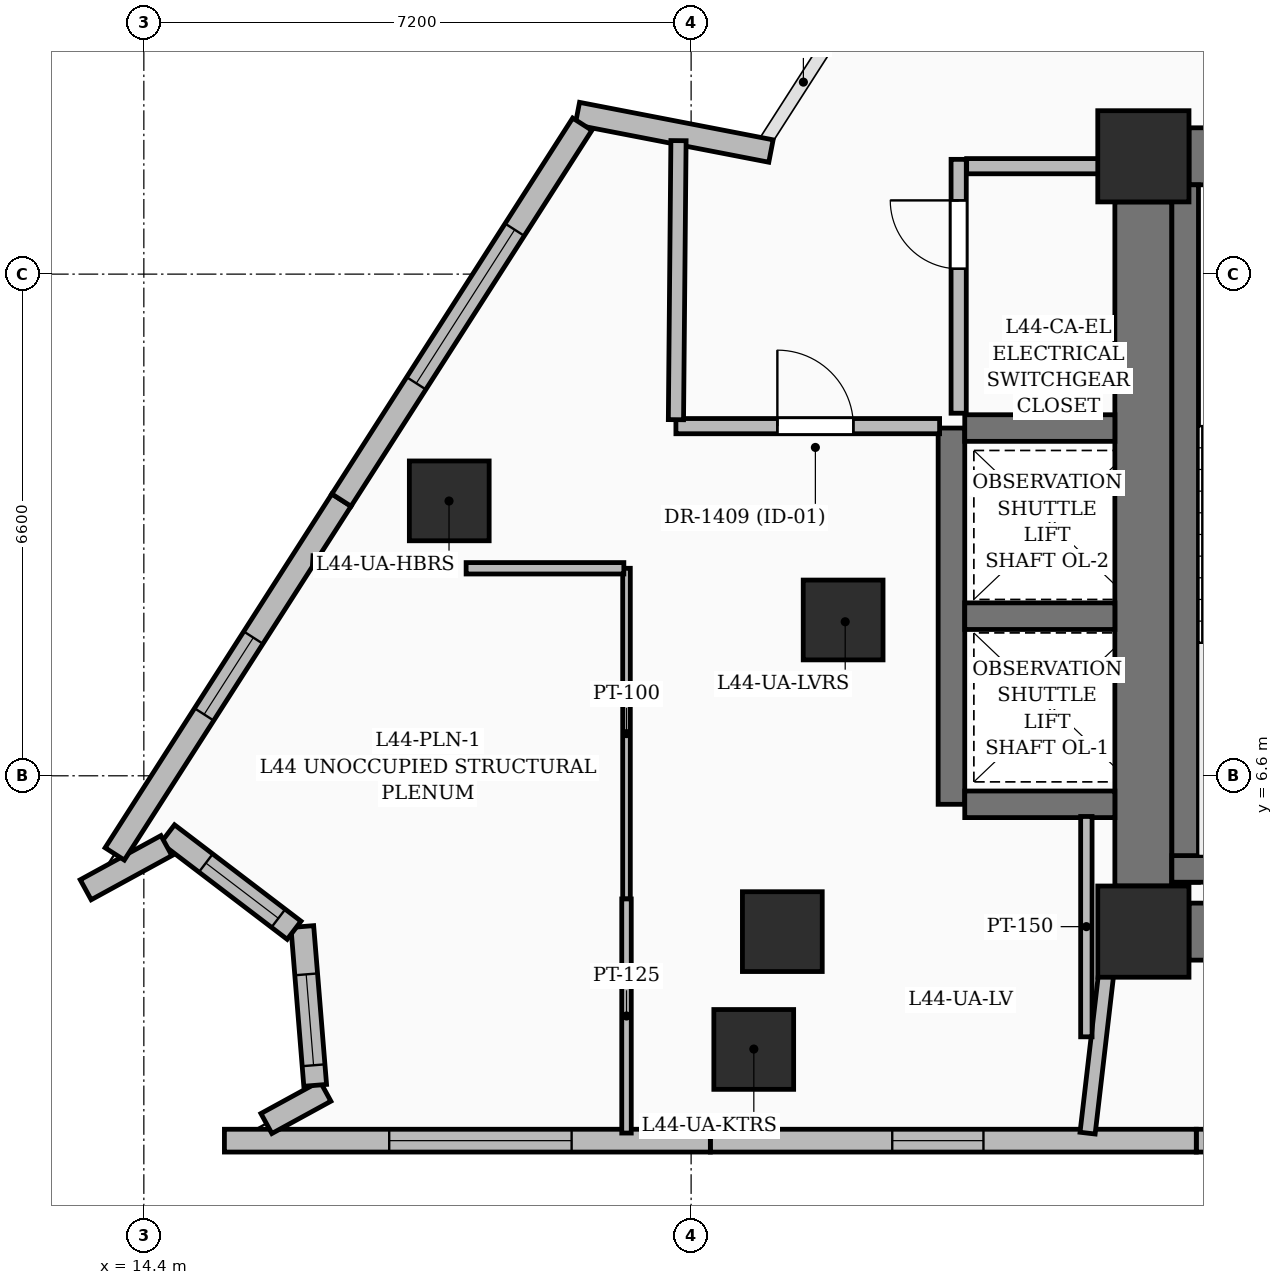
"""IFC4 building model, lengths in metres.
Left out: names, types, materials, properties, quantities, classifications, styles, units other than length and angle.
Written with IfcOpenShell. Run it as: python <this file> out.ifc"""

import sys

from ifc_helpers import new_model, si_unit, direction, frame, frame_2d, origin, origin_2d, place, context, subcontext, project, spatial, rectangle, extrude, element, fill, save


model = new_model("IFC4")
c1 = context("Model", 3, precision=1e-05, world=origin(), true_north=direction((0.0, 1.0)))
c2 = subcontext(c1, "Body", "Model", "MODEL_VIEW")
j1 = project(units=[si_unit("LENGTHUNIT", "METRE"), si_unit("PLANEANGLEUNIT", "RADIAN")], contexts=[c1])
p1 = place(None, origin())
s1 = spatial("IfcSite", under=j1, at=p1, CompositionType="ELEMENT")
p2 = place(p1, origin())
s2 = spatial("IfcBuilding", under=s1, at=p2, CompositionType="ELEMENT")
p3 = place(p2, frame((0.0, 0.0, 171.6)))
s3 = spatial("IfcBuildingStorey", under=s2, at=p3, CompositionType="ELEMENT", Elevation=171.6)
for number, where, z_axis, x_axis in (
    (1, (27.55, 4.55, 0.0), (0.0, 0.0, 1.0), (1.0, 0.0, 0.0)),
    (2, (27.55, 14.75, 0.0), (0.0, 0.0, 1.0), (1.0, 0.0, 0.0)),
):
    element("IfcColumn", number, at=place(p3, frame(where, z_axis=z_axis, x_axis=x_axis)), inside=s3, PredefinedType="COLUMN", context=c2, shape_type="SweptSolid", body=[
        extrude(rectangle(XDim=1.2, YDim=1.2, at=origin_2d()), origin(), (0.0, 0.0, 1.0), 3.6),
    ])
for number, where, z_axis, x_axis in (
    (3, (22.8, 4.55, 0.0), (0.0, 0.0, 1.0), (1.0, 0.0, 0.0)),
    (4, (23.6, 8.65, 0.0), (0.0, 0.0, 1.0), (1.0, 0.0, 0.0)),
):
    element("IfcColumn", number, at=place(p3, frame(where, z_axis=z_axis, x_axis=x_axis)), inside=s3, PredefinedType="COLUMN", context=c2, shape_type="SweptSolid", body=[
        extrude(rectangle(XDim=1.05, YDim=1.05, at=origin_2d()), origin(), (0.0, 0.0, 1.0), 3.6),
    ])
p4 = place(p3, frame((28.15, 4.55, 0.0), z_axis=(0.0, 0.0, 1.0), x_axis=(1.0, 0.0, 0.0)))
e5 = element("IfcWall", 5, at=p4, inside=s3, PredefinedType="SHEAR", context=c2, shape_type="SweptSolid", body=[
    extrude(rectangle(XDim=6.4, YDim=0.75, at=frame_2d((3.2, 0.0))), origin(), (0.0, 0.0, 1.0), 3.6),
])
p5 = place(p3, frame((28.15, 14.75, 0.0), z_axis=(0.0, 0.0, 1.0), x_axis=(1.0, 0.0, 0.0)))
e6 = element("IfcWall", 6, at=p5, inside=s3, PredefinedType="SHEAR", context=c2, shape_type="SweptSolid", body=[
    extrude(rectangle(XDim=6.4, YDim=0.75, at=frame_2d((3.2, 0.0))), origin(), (0.0, 0.0, 1.0), 3.6),
])
p6 = place(p5, frame((1.025, 0.0, 0.0)))
e7 = element("IfcOpeningElement", 7, at=p6, cuts=e6, PredefinedType="OPENING", context=c2, shape_type="SweptSolid", body=[
    extrude(rectangle(XDim=1.05, YDim=2.15, at=frame_2d((0.525, 1.075))), frame((0.0, 0.385, 0.0), z_axis=(0.0, -1.0, 0.0), x_axis=(1.0, 0.0, 0.0)), (0.0, 0.0, 1.0), 0.77),
])
p7 = place(p5, frame((3.8, 0.0, 0.0)))
e8 = element("IfcOpeningElement", 8, at=p7, cuts=e6, PredefinedType="OPENING", context=c2, shape_type="SweptSolid", body=[
    extrude(rectangle(XDim=1.1, YDim=2.2, at=frame_2d((0.55, 1.1))), frame((0.0, 0.385, 0.0), z_axis=(0.0, -1.0, 0.0), x_axis=(1.0, 0.0, 0.0)), (0.0, 0.0, 1.0), 0.77),
])
p8 = place(p3, frame((27.55, 5.15, 0.0), z_axis=(0.0, 0.0, 1.0), x_axis=(0.0, 1.0, 0.0)))
e9 = element("IfcWall", 9, at=p8, inside=s3, PredefinedType="SHEAR", context=c2, shape_type="SweptSolid", body=[
    extrude(rectangle(XDim=9.0, YDim=0.75, at=frame_2d((4.5, 0.0))), origin(), (0.0, 0.0, 1.0), 3.6),
])
p9 = place(p3, frame((28.1, 5.2, 0.0), z_axis=(0.0, 0.0, 1.0), x_axis=(0.0, 1.0, 0.0)))
e10 = element("IfcWall", 10, at=p9, inside=s3, PredefinedType="SOLIDWALL", context=c2, shape_type="SweptSolid", body=[
    extrude(rectangle(XDim=9.175, YDim=0.35, at=frame_2d((4.587, 0.0))), origin(), (0.0, 0.0, 1.0), 3.6),
])
p10 = place(p3, frame((27.925, 5.375, 0.0), z_axis=(0.0, 0.0, 1.0), x_axis=(1.0, 0.0, 0.0)))
e11 = element("IfcWall", 11, at=p10, inside=s3, PredefinedType="SOLIDWALL", context=c2, shape_type="SweptSolid", body=[
    extrude(rectangle(XDim=3.55, YDim=0.35, at=frame_2d((1.775, 0.0))), origin(), (0.0, 0.0, 1.0), 3.6),
])
p11 = place(p3, frame((25.025, 6.225, 0.0), z_axis=(0.0, 0.0, 1.0), x_axis=(0.0, 1.0, 0.0)))
e12 = element("IfcWall", 12, at=p11, inside=s3, PredefinedType="SOLIDWALL", context=c2, shape_type="SweptSolid", body=[
    extrude(rectangle(XDim=4.95, YDim=0.35, at=frame_2d((2.475, 0.0))), origin(), (0.0, 0.0, 1.0), 3.6),
])
for number, where, z_axis, x_axis in (
    (13, (25.2, 6.225, 0.0), (0.0, 0.0, 1.0), (1.0, 0.0, 0.0)),
    (14, (25.2, 8.7, 0.0), (0.0, 0.0, 1.0), (1.0, 0.0, 0.0)),
    (15, (25.2, 11.175, 0.0), (0.0, 0.0, 1.0), (1.0, 0.0, 0.0)),
):
    element("IfcWall", number, at=place(p3, frame(where, z_axis=z_axis, x_axis=x_axis)), inside=s3, PredefinedType="SOLIDWALL", context=c2, shape_type="SweptSolid", body=[
        extrude(rectangle(XDim=1.975, YDim=0.35, at=frame_2d((0.988, 0.0))), origin(), (0.0, 0.0, 1.0), 3.6),
    ])
for number, where, z_axis, x_axis in (
    (16, (22.424, 3.0, 0.0), (0.0, 0.0, 1.0), (1.0, 0.0, 0.0)),
    (17, (18.418, 10.217, 0.0), (0.0, 0.0, 1.0), (1.0, 0.0, 0.0)),
):
    element("IfcColumn", number, at=place(p3, frame(where, z_axis=z_axis, x_axis=x_axis)), inside=s3, PredefinedType="COLUMN", context=c2, shape_type="SweptSolid", body=[
        extrude(rectangle(XDim=1.05, YDim=1.05, at=origin_2d()), origin(), (0.0, 0.0, 1.0), 3.6),
    ])
p12 = place(p3, frame((20.104, 15.312, 0.0), z_axis=(0.0, 0.0, 1.0), x_axis=(0.98176398898, -0.190103839891, 0.0)))
e18 = element("IfcWall", 18, at=p12, inside=s3, PredefinedType="SOLIDWALL", context=c2, shape_type="SweptSolid", body=[
    extrude(rectangle(XDim=2.594, YDim=0.3, at=frame_2d((1.297, 0.0))), origin(), (0.0, 0.0, 1.0), 2.575),
])
p13 = place(p3, frame((34.639, 1.8, 0.0), z_axis=(0.0, 0.0, 1.0), x_axis=(-1.0, 0.0, 0.0)))
e19 = element("IfcWall", 19, at=p13, inside=s3, PredefinedType="SOLIDWALL", context=c2, shape_type="SweptSolid", body=[
    extrude(rectangle(XDim=6.393, YDim=0.3, at=frame_2d((3.196, 0.0))), origin(), (0.0, 0.0, 1.0), 3.35),
])
p14 = place(p13, frame((2.4, 0.0, 0.6)))
e20 = element("IfcOpeningElement", 20, at=p14, cuts=e19, PredefinedType="OPENING", context=c2, shape_type="SweptSolid", body=[
    extrude(rectangle(XDim=1.5, YDim=2.1, at=frame_2d((0.75, 1.05))), frame((0.0, 0.16, 0.0), z_axis=(0.0, -1.0, 0.0), x_axis=(1.0, 0.0, 0.0)), (0.0, 0.0, 1.0), 0.32),
])
p15 = place(p3, frame((28.246, 1.8, 0.0), z_axis=(0.0, 0.0, 1.0), x_axis=(-1.0, 0.0, 0.0)))
e21 = element("IfcWall", 21, at=p15, inside=s3, PredefinedType="SOLIDWALL", context=c2, shape_type="SweptSolid", body=[
    extrude(rectangle(XDim=6.393, YDim=0.3, at=frame_2d((3.197, 0.0))), origin(), (0.0, 0.0, 1.0), 3.35),
])
p16 = place(p15, frame((2.8, 0.0, 0.8)))
e22 = element("IfcOpeningElement", 22, at=p16, cuts=e21, PredefinedType="OPENING", context=c2, shape_type="SweptSolid", body=[
    extrude(rectangle(XDim=1.2, YDim=1.8, at=frame_2d((0.6, 0.9))), frame((0.0, 0.16, 0.0), z_axis=(0.0, -1.0, 0.0), x_axis=(1.0, 0.0, 0.0)), (0.0, 0.0, 1.0), 0.32),
])
p17 = place(p3, frame((21.853, 1.8, 0.0), z_axis=(0.0, 0.0, 1.0), x_axis=(-1.0, 0.0, 0.0)))
e23 = element("IfcWall", 23, at=p17, inside=s3, PredefinedType="SOLIDWALL", context=c2, shape_type="SweptSolid", body=[
    extrude(rectangle(XDim=6.393, YDim=0.3, at=frame_2d((3.197, 0.0))), origin(), (0.0, 0.0, 1.0), 3.35),
])
p18 = place(p17, frame((1.825, 0.0, 0.6)))
e24 = element("IfcOpeningElement", 24, at=p18, cuts=e23, PredefinedType="OPENING", context=c2, shape_type="SweptSolid", body=[
    extrude(rectangle(XDim=2.4, YDim=2.1, at=frame_2d((1.2, 1.05))), frame((0.0, 0.16, 0.0), z_axis=(0.0, -1.0, 0.0), x_axis=(1.0, 0.0, 0.0)), (0.0, 0.0, 1.0), 0.32),
])
p19 = place(p3, frame((16.012, 2.025, 0.0), z_axis=(0.0, 0.0, 1.0), x_axis=(0.877262241919, 0.480011415389, 0.0)))
e25 = element("IfcWall", 25, at=p19, inside=s3, PredefinedType="SOLIDWALL", context=c2, shape_type="SweptSolid", body=[
    extrude(rectangle(XDim=0.885, YDim=0.3, at=frame_2d((0.442, 0.0))), origin(), (0.0, 0.0, 1.0), 3.35),
])
p20 = place(p3, frame((16.654, 2.528, 0.0), z_axis=(0.0, 0.0, 1.0), x_axis=(-0.080962879454, 0.996717117416, 0.0)))
e26 = element("IfcWall", 26, at=p20, inside=s3, PredefinedType="SOLIDWALL", context=c2, shape_type="SweptSolid", body=[
    extrude(rectangle(XDim=2.096, YDim=0.3, at=frame_2d((1.048, 0.0))), origin(), (0.0, 0.0, 1.0), 3.35),
])
p21 = place(p20, frame((0.265, 0.0, 0.8)))
e27 = element("IfcOpeningElement", 27, at=p21, cuts=e26, PredefinedType="OPENING", context=c2, shape_type="SweptSolid", body=[
    extrude(rectangle(XDim=1.2, YDim=1.8, at=frame_2d((0.6, 0.9))), frame((0.0, 0.16, 0.0), z_axis=(0.0, -1.0, 0.0), x_axis=(1.0, 0.0, 0.0)), (0.0, 0.0, 1.0), 0.32),
])
p22 = place(p3, frame((16.377, 4.568, 0.0), z_axis=(0.0, 0.0, 1.0), x_axis=(-0.795383499791, 0.606106499107, 0.0)))
e28 = element("IfcWall", 28, at=p22, inside=s3, PredefinedType="SOLIDWALL", context=c2, shape_type="SweptSolid", body=[
    extrude(rectangle(XDim=2.092, YDim=0.3, at=frame_2d((1.046, 0.0))), origin(), (0.0, 0.0, 1.0), 3.35),
])
p23 = place(p22, frame((0.26, 0.0, 0.8)))
e29 = element("IfcOpeningElement", 29, at=p23, cuts=e28, PredefinedType="OPENING", context=c2, shape_type="SweptSolid", body=[
    extrude(rectangle(XDim=1.2, YDim=1.8, at=frame_2d((0.6, 0.9))), frame((0.0, 0.16, 0.0), z_axis=(0.0, -1.0, 0.0), x_axis=(1.0, 0.0, 0.0)), (0.0, 0.0, 1.0), 0.32),
])
p24 = place(p3, frame((14.697, 5.681, 0.0), z_axis=(0.0, 0.0, 1.0), x_axis=(-0.877355211776, -0.47984146587, 0.0)))
e30 = element("IfcWall", 30, at=p24, inside=s3, PredefinedType="SOLIDWALL", context=c2, shape_type="SweptSolid", body=[
    extrude(rectangle(XDim=1.21, YDim=0.3, at=frame_2d((0.605, 0.0))), origin(), (0.0, 0.0, 1.0), 3.35),
])
p25 = place(p3, frame((14.017, 5.572, 0.0), z_axis=(0.0, 0.0, 1.0), x_axis=(0.539464660722, 0.84200824214, 0.0)))
e31 = element("IfcWall", 31, at=p25, inside=s3, PredefinedType="SOLIDWALL", context=c2, shape_type="SweptSolid", body=[
    extrude(rectangle(XDim=5.529, YDim=0.3, at=frame_2d((2.764, 0.0))), origin(), (0.0, 0.0, 1.0), 3.35),
])
p26 = place(p25, frame((2.18, 0.0, 0.8)))
e32 = element("IfcOpeningElement", 32, at=p26, cuts=e31, PredefinedType="OPENING", context=c2, shape_type="SweptSolid", body=[
    extrude(rectangle(XDim=1.2, YDim=1.8, at=frame_2d((0.6, 0.9))), frame((0.0, 0.16, 0.0), z_axis=(0.0, -1.0, 0.0), x_axis=(1.0, 0.0, 0.0)), (0.0, 0.0, 1.0), 0.32),
])
p27 = place(p3, frame((17.0, 10.227, 0.0), z_axis=(0.0, 0.0, 1.0), x_axis=(0.539500668401, 0.841985171363, 0.0)))
e33 = element("IfcWall", 33, at=p27, inside=s3, PredefinedType="SOLIDWALL", context=c2, shape_type="SweptSolid", body=[
    extrude(rectangle(XDim=5.873, YDim=0.3, at=frame_2d((2.937, 0.0))), origin(), (0.0, 0.0, 1.0), 3.35),
])
p28 = place(p27, frame((1.825, 0.0, 0.6)))
e34 = element("IfcOpeningElement", 34, at=p28, cuts=e33, PredefinedType="OPENING", context=c2, shape_type="SweptSolid", body=[
    extrude(rectangle(XDim=2.4, YDim=2.1, at=frame_2d((1.2, 1.05))), frame((0.0, 0.16, 0.0), z_axis=(0.0, -1.0, 0.0), x_axis=(1.0, 0.0, 0.0)), (0.0, 0.0, 1.0), 0.32),
])
p29 = place(p3, frame((25.12, 11.37, 0.0), z_axis=(0.0, 0.0, 1.0), x_axis=(0.0, 1.0, 0.0)))
e35 = element("IfcWall", 35, at=p29, inside=s3, PredefinedType="PARTITIONING", context=c2, shape_type="SweptSolid", body=[
    extrude(rectangle(XDim=3.34, YDim=0.2, at=frame_2d((1.67, 0.0))), origin(), (0.0, 0.0, 1.0), 3.35),
])
p30 = place(p29, frame((1.9, 0.0, 0.0)))
e36 = element("IfcOpeningElement", 36, at=p30, cuts=e35, PredefinedType="OPENING", context=c2, shape_type="SweptSolid", body=[
    extrude(rectangle(XDim=0.9, YDim=2.1, at=frame_2d((0.45, 1.05))), frame((0.0, 0.11, 0.0), z_axis=(0.0, -1.0, 0.0), x_axis=(1.0, 0.0, 0.0)), (0.0, 0.0, 1.0), 0.22),
])
p31 = place(p3, frame((25.225, 14.62, 0.0), z_axis=(0.0, 0.0, 1.0), x_axis=(1.0, 0.0, 0.0)))
e37 = element("IfcWall", 37, at=p31, inside=s3, PredefinedType="PARTITIONING", context=c2, shape_type="SweptSolid", body=[
    extrude(rectangle(XDim=1.935, YDim=0.2, at=frame_2d((0.967, 0.0))), origin(), (0.0, 0.0, 1.0), 3.35),
])
p32 = place(p3, frame((21.4, 11.2, 0.0), z_axis=(0.0, 0.0, 1.0), x_axis=(1.0, 0.0, 0.0)))
e38 = element("IfcWall", 38, at=p32, inside=s3, PredefinedType="PARTITIONING", context=c2, shape_type="SweptSolid", body=[
    extrude(rectangle(XDim=3.469, YDim=0.2, at=frame_2d((1.735, 0.0))), origin(), (0.0, 0.0, 1.0), 3.35),
])
p33 = place(p32, frame((1.335, 0.0, 0.0)))
e39 = element("IfcOpeningElement", 39, at=p33, cuts=e38, PredefinedType="OPENING", context=c2, shape_type="SweptSolid", body=[
    extrude(rectangle(XDim=1.0, YDim=2.2, at=frame_2d((0.5, 1.1))), frame((0.0, 0.11, 0.0), z_axis=(0.0, -1.0, 0.0), x_axis=(1.0, 0.0, 0.0)), (0.0, 0.0, 1.0), 0.22),
])
p34 = place(p3, frame((20.75, 9.33, 0.0), z_axis=(0.0, 0.0, 1.0), x_axis=(0.0, -1.0, 0.0)))
e40 = element("IfcWall", 40, at=p34, inside=s3, PredefinedType="PARTITIONING", context=c2, shape_type="SweptSolid", body=[
    extrude(rectangle(XDim=4.35, YDim=0.1, at=frame_2d((2.175, 0.0))), origin(), (0.0, 0.0, 1.0), 1.12),
])
p35 = place(p3, frame((16.621, 9.42, 0.0), z_axis=(0.0, 0.0, 1.0), x_axis=(0.99838487267, -0.056812375621, 0.0)))
e41 = element("IfcWall", 41, at=p35, inside=s3, PredefinedType="PARTITIONING", context=c2, shape_type="SweptSolid", body=[
    extrude(rectangle(XDim=1.581, YDim=0.15, at=frame_2d((0.791, 0.0))), origin(), (0.0, 0.0, 1.0), 3.35),
])
p36 = place(p3, frame((18.64, 9.33, 0.0), z_axis=(0.0, 0.0, 1.0), x_axis=(1.0, 0.0, 0.0)))
e42 = element("IfcWall", 42, at=p36, inside=s3, PredefinedType="PARTITIONING", context=c2, shape_type="SweptSolid", body=[
    extrude(rectangle(XDim=2.075, YDim=0.15, at=frame_2d((1.038, 0.0))), origin(), (0.0, 0.0, 1.0), 1.12),
])
p37 = place(p3, frame((20.75, 4.98, 0.0), z_axis=(0.0, 0.0, 1.0), x_axis=(0.0, -1.0, 0.0)))
e43 = element("IfcWall", 43, at=p37, inside=s3, PredefinedType="PARTITIONING", context=c2, shape_type="SweptSolid", body=[
    extrude(rectangle(XDim=3.08, YDim=0.125, at=frame_2d((1.54, 0.0))), origin(), (0.0, 0.0, 1.0), 3.35),
])
p38 = place(p3, frame((26.816, 1.899, 0.0), z_axis=(0.0, 0.0, 1.0), x_axis=(0.115777166212, 0.993275212509, 0.0)))
e44 = element("IfcWall", 44, at=p38, inside=s3, PredefinedType="PARTITIONING", context=c2, shape_type="SweptSolid", body=[
    extrude(rectangle(XDim=3.102, YDim=0.2, at=frame_2d((1.551, 0.0))), origin(), (0.0, 0.0, 1.0), 1.12),
])
p39 = place(p3, frame((21.434, 14.956, 0.0), z_axis=(0.0, 0.0, 1.0), x_axis=(-0.009176976053, -0.999957890669, 0.0)))
e45 = element("IfcWall", 45, at=p39, inside=s3, PredefinedType="PARTITIONING", context=c2, shape_type="SweptSolid", body=[
    extrude(rectangle(XDim=3.671, YDim=0.2, at=frame_2d((1.836, 0.0))), origin(), (0.0, 0.0, 1.0), 2.57),
])
p40 = place(p3, frame((26.8, 3.166, 0.0), z_axis=(0.0, 0.0, 1.0), x_axis=(0.0, 1.0, 0.0)))
e46 = element("IfcWall", 46, at=p40, inside=s3, PredefinedType="PARTITIONING", context=c2, shape_type="SweptSolid", body=[
    extrude(rectangle(XDim=2.899, YDim=0.15, at=frame_2d((1.449, 0.0))), origin(), (0.0, 0.0, 1.0), 1.12),
])
p41 = place(p16, origin())
e47 = element("IfcWindow", 47, at=p41, inside=s3, PartitioningType="SINGLE_PANEL", PredefinedType="WINDOW", context=c2, shape_type="SweptSolid", body=[
    extrude(rectangle(XDim=1.2, YDim=1.8, at=frame_2d((0.6, 0.9))), frame((0.0, 0.03, 0.0), z_axis=(0.0, -1.0, 0.0), x_axis=(1.0, 0.0, 0.0)), (0.0, 0.0, 1.0), 0.06),
])
fill(e22, e47)
p42 = place(p18, origin())
e48 = element("IfcWindow", 48, at=p42, inside=s3, PartitioningType="SINGLE_PANEL", PredefinedType="WINDOW", context=c2, shape_type="SweptSolid", body=[
    extrude(rectangle(XDim=2.4, YDim=2.1, at=frame_2d((1.2, 1.05))), frame((0.0, 0.03, 0.0), z_axis=(0.0, -1.0, 0.0), x_axis=(1.0, 0.0, 0.0)), (0.0, 0.0, 1.0), 0.06),
])
fill(e24, e48)
p43 = place(p21, origin())
e49 = element("IfcWindow", 49, at=p43, inside=s3, PartitioningType="SINGLE_PANEL", PredefinedType="WINDOW", context=c2, shape_type="SweptSolid", body=[
    extrude(rectangle(XDim=1.2, YDim=1.8, at=frame_2d((0.6, 0.9))), frame((0.0, 0.03, 0.0), z_axis=(0.0, -1.0, 0.0), x_axis=(1.0, 0.0, 0.0)), (0.0, 0.0, 1.0), 0.06),
])
fill(e27, e49)
p44 = place(p23, origin())
e50 = element("IfcWindow", 50, at=p44, inside=s3, PartitioningType="SINGLE_PANEL", PredefinedType="WINDOW", context=c2, shape_type="SweptSolid", body=[
    extrude(rectangle(XDim=1.2, YDim=1.8, at=frame_2d((0.6, 0.9))), frame((0.0, 0.03, 0.0), z_axis=(0.0, -1.0, 0.0), x_axis=(1.0, 0.0, 0.0)), (0.0, 0.0, 1.0), 0.06),
])
fill(e29, e50)
p45 = place(p26, origin())
e51 = element("IfcWindow", 51, at=p45, inside=s3, PartitioningType="SINGLE_PANEL", PredefinedType="WINDOW", context=c2, shape_type="SweptSolid", body=[
    extrude(rectangle(XDim=1.2, YDim=1.8, at=frame_2d((0.6, 0.9))), frame((0.0, 0.03, 0.0), z_axis=(0.0, -1.0, 0.0), x_axis=(1.0, 0.0, 0.0)), (0.0, 0.0, 1.0), 0.06),
])
fill(e32, e51)
p46 = place(p28, origin())
e52 = element("IfcWindow", 52, at=p46, inside=s3, PartitioningType="SINGLE_PANEL", PredefinedType="WINDOW", context=c2, shape_type="SweptSolid", body=[
    extrude(rectangle(XDim=2.4, YDim=2.1, at=frame_2d((1.2, 1.05))), frame((0.0, 0.03, 0.0), z_axis=(0.0, -1.0, 0.0), x_axis=(1.0, 0.0, 0.0)), (0.0, 0.0, 1.0), 0.06),
])
fill(e34, e52)
p47 = place(p30, origin())
e53 = element("IfcDoor", 53, at=p47, inside=s3, OperationType="SINGLE_SWING_RIGHT", PredefinedType="DOOR", context=c2, shape_type="SweptSolid", body=[
    extrude(rectangle(XDim=0.9, YDim=2.1, at=frame_2d((0.45, 1.05))), frame((0.0, 0.025, 0.0), z_axis=(0.0, -1.0, 0.0), x_axis=(1.0, 0.0, 0.0)), (0.0, 0.0, 1.0), 0.05),
])
fill(e36, e53)
p48 = place(p33, origin())
e54 = element("IfcDoor", 54, at=p48, inside=s3, OperationType="SINGLE_SWING_LEFT", PredefinedType="DOOR", context=c2, shape_type="SweptSolid", body=[
    extrude(rectangle(XDim=1.0, YDim=2.2, at=frame_2d((0.5, 1.1))), frame((0.0, 0.025, 0.0), z_axis=(0.0, -1.0, 0.0), x_axis=(1.0, 0.0, 0.0)), (0.0, 0.0, 1.0), 0.05),
])
fill(e39, e54)
save(model, sys.argv[1])
